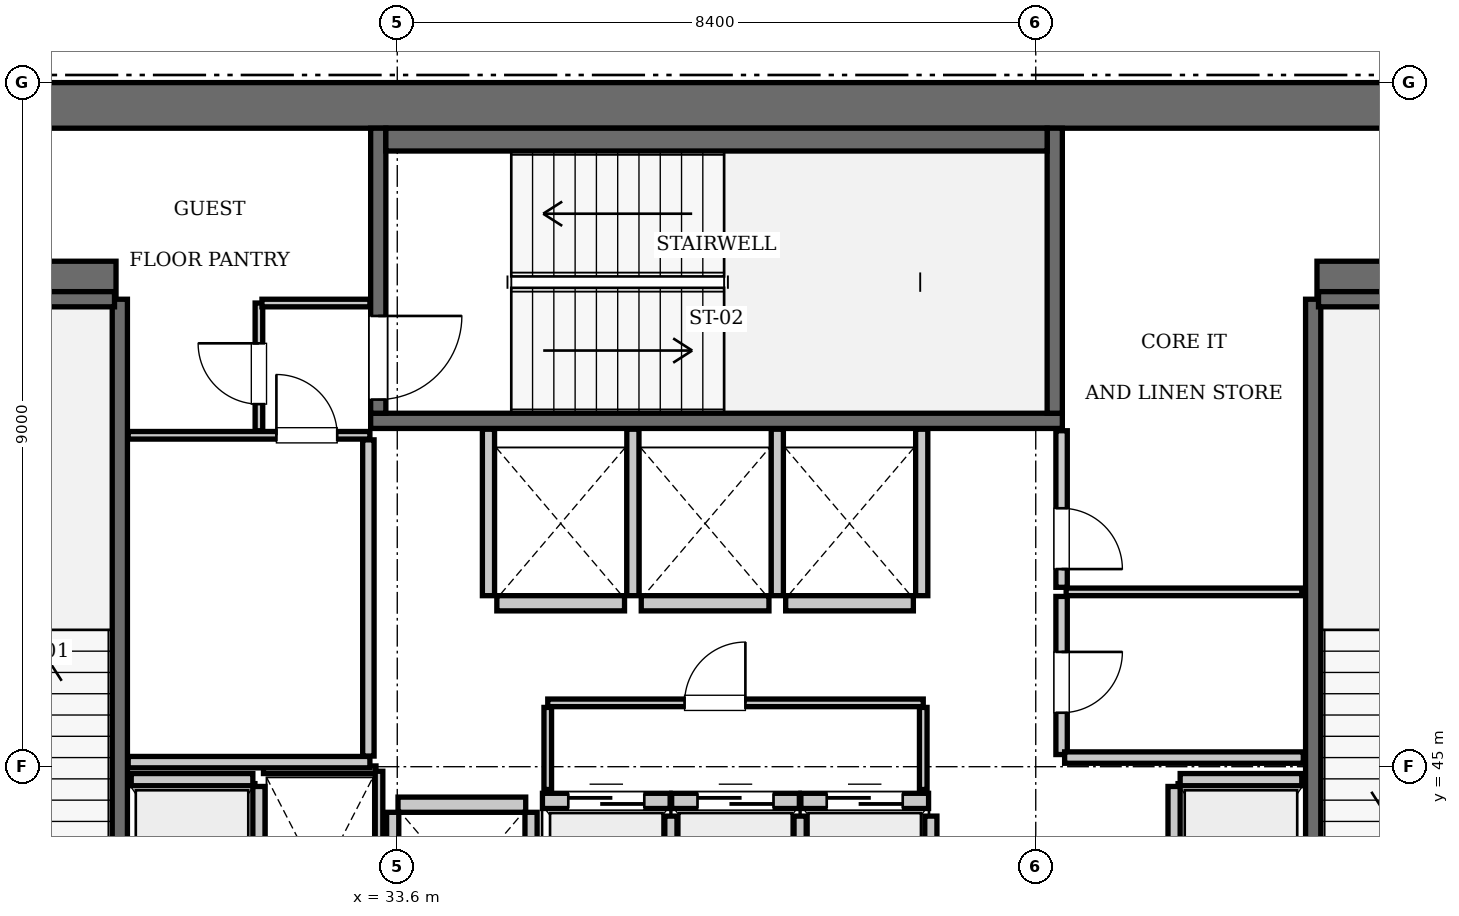
"""IFC4 building model, lengths in metres.
Left out: names, types, materials, properties, quantities, classifications, styles, units other than length and angle.
Written with IfcOpenShell. Run it as: python <this file> out.ifc"""

import sys

from ifc_helpers import new_model, si_unit, direction, frame, frame_2d, origin, place, context, subcontext, project, spatial, rectangle, extrude, element, fill, save


model = new_model("IFC4")
c1 = context("Model", 3, precision=1e-05, world=origin(), true_north=direction((0.0, 1.0)))
c2 = subcontext(c1, "Body", "Model", "MODEL_VIEW")
j1 = project(units=[si_unit("LENGTHUNIT", "METRE"), si_unit("PLANEANGLEUNIT", "RADIAN")], contexts=[c1])
p1 = place(None, origin())
s1 = spatial("IfcSite", under=j1, at=p1, CompositionType="ELEMENT")
p2 = place(p1, origin())
s2 = spatial("IfcBuilding", under=s1, at=p2, CompositionType="ELEMENT")
p3 = place(p2, frame((0.0, 0.0, 270.2)))
s3 = spatial("IfcBuildingStorey", under=s2, at=p3, CompositionType="ELEMENT", Elevation=270.2)
p4 = place(p3, frame((25.2, 53.7, 0.0), z_axis=(0.0, 0.0, 1.0), x_axis=(1.0, 0.0, 0.0)))
e1 = element("IfcWall", 1, at=p4, inside=s3, PredefinedType="SHEAR", context=c2, shape_type="SweptSolid", body=[
    extrude(rectangle(XDim=25.2, YDim=0.6, at=frame_2d((12.6, 0.0))), origin(), (0.0, 0.0, 1.0), 3.85),
])
p5 = place(p3, frame((25.8, 51.4, 0.0), z_axis=(0.0, 0.0, 1.0), x_axis=(1.0, 0.0, 0.0)))
e2 = element("IfcWall", 2, at=p5, inside=s3, PredefinedType="SHEAR", context=c2, shape_type="SweptSolid", body=[
    extrude(rectangle(XDim=4.1, YDim=0.5, at=frame_2d((2.05, 0.0))), origin(), (0.0, 0.0, 1.0), 3.85),
])
p6 = place(p3, frame((45.7, 51.4, 0.0), z_axis=(0.0, 0.0, 1.0), x_axis=(1.0, 0.0, 0.0)))
e3 = element("IfcWall", 3, at=p6, inside=s3, PredefinedType="SHEAR", context=c2, shape_type="SweptSolid", body=[
    extrude(rectangle(XDim=4.1, YDim=0.5, at=frame_2d((2.05, 0.0))), origin(), (0.0, 0.0, 1.0), 3.85),
])
p7 = place(p3, frame((29.95, 42.0, 0.0), z_axis=(0.0, 0.0, 1.0), x_axis=(0.0, 1.0, 0.0)))
e4 = element("IfcWall", 4, at=p7, inside=s3, PredefinedType="SOLIDWALL", context=c2, shape_type="SweptSolid", body=[
    extrude(rectangle(XDim=9.15, YDim=0.2, at=frame_2d((4.575, 0.0))), origin(), (0.0, 0.0, 1.0), 3.61),
])
p8 = place(p3, frame((26.38, 51.15, 0.0), z_axis=(0.0, 0.0, 1.0), x_axis=(1.0, 0.0, 0.0)))
e5 = element("IfcWall", 5, at=p8, inside=s3, PredefinedType="SOLIDWALL", context=c2, shape_type="SweptSolid", body=[
    extrude(rectangle(XDim=3.5, YDim=0.2, at=frame_2d((1.75, 0.0))), origin(), (0.0, 0.0, 1.0), 3.61),
])
p9 = place(p3, frame((33.25, 49.55, 0.0), z_axis=(0.0, 0.0, 1.0), x_axis=(1.0, 0.0, 0.0)))
e6 = element("IfcWall", 6, at=p9, inside=s3, PredefinedType="SOLIDWALL", context=c2, shape_type="SweptSolid", body=[
    extrude(rectangle(XDim=9.1, YDim=0.2, at=frame_2d((4.55, 0.0))), origin(), (0.0, 0.0, 1.0), 3.61),
])
p10 = place(p3, frame((42.25, 49.65, 0.0), z_axis=(0.0, 0.0, 1.0), x_axis=(0.0, 1.0, 0.0)))
e7 = element("IfcWall", 7, at=p10, inside=s3, PredefinedType="SOLIDWALL", context=c2, shape_type="SweptSolid", body=[
    extrude(rectangle(XDim=3.75, YDim=0.2, at=frame_2d((1.875, 0.0))), origin(), (0.0, 0.0, 1.0), 3.61),
])
p11 = place(p3, frame((33.35, 49.65, 0.0), z_axis=(0.0, 0.0, 1.0), x_axis=(0.0, 1.0, 0.0)))
e8 = element("IfcWall", 8, at=p11, inside=s3, PredefinedType="SOLIDWALL", context=c2, shape_type="SweptSolid", body=[
    extrude(rectangle(XDim=3.75, YDim=0.2, at=frame_2d((1.875, 0.0))), origin(), (0.0, 0.0, 1.0), 3.61),
])
p12 = place(p11, frame((0.18, 0.0, 0.0)))
e9 = element("IfcOpeningElement", 9, at=p12, cuts=e8, PredefinedType="OPENING", context=c2, shape_type="SweptSolid", body=[
    extrude(rectangle(XDim=1.1, YDim=2.15, at=frame_2d((0.55, 1.075))), frame((0.0, 0.11, 0.0), z_axis=(0.0, -1.0, 0.0), x_axis=(1.0, 0.0, 0.0)), (0.0, 0.0, 1.0), 0.22),
])
p13 = place(p3, frame((33.45, 53.25, 0.0), z_axis=(0.0, 0.0, 1.0), x_axis=(1.0, 0.0, 0.0)))
e10 = element("IfcWall", 10, at=p13, inside=s3, PredefinedType="SOLIDWALL", context=c2, shape_type="SweptSolid", body=[
    extrude(rectangle(XDim=8.7, YDim=0.3, at=frame_2d((4.35, 0.0))), origin(), (0.0, 0.0, 1.0), 3.61),
])
p14 = place(p3, frame((45.65, 42.0, 0.0), z_axis=(0.0, 0.0, 1.0), x_axis=(0.0, 1.0, 0.0)))
e11 = element("IfcWall", 11, at=p14, inside=s3, PredefinedType="SOLIDWALL", context=c2, shape_type="SweptSolid", body=[
    extrude(rectangle(XDim=9.15, YDim=0.2, at=frame_2d((4.575, 0.0))), origin(), (0.0, 0.0, 1.0), 3.61),
])
p15 = place(p3, frame((45.72, 51.15, 0.0), z_axis=(0.0, 0.0, 1.0), x_axis=(1.0, 0.0, 0.0)))
e12 = element("IfcWall", 12, at=p15, inside=s3, PredefinedType="SOLIDWALL", context=c2, shape_type="SweptSolid", body=[
    extrude(rectangle(XDim=3.5, YDim=0.2, at=frame_2d((1.75, 0.0))), origin(), (0.0, 0.0, 1.0), 3.61),
])
p16 = place(p3, frame((35.51, 44.55, 0.0), z_axis=(0.0, 0.0, 1.0), x_axis=(1.0, 0.0, 0.0)))
e13 = element("IfcWall", 13, at=p16, inside=s3, PredefinedType="SOLIDWALL", context=c2, shape_type="SweptSolid", body=[
    extrude(rectangle(XDim=1.68, YDim=0.2, at=frame_2d((0.84, 0.0))), origin(), (0.0, 0.0, 1.0), 3.61),
])
p17 = place(p16, frame((0.34, 0.0, 0.0)))
e14 = element("IfcOpeningElement", 14, at=p17, cuts=e13, PredefinedType="OPENING", context=c2, shape_type="SweptSolid", body=[
    extrude(rectangle(XDim=1.0, YDim=2.15, at=frame_2d((0.5, 1.075))), frame((0.0, 0.11, 0.0), z_axis=(0.0, -1.0, 0.0), x_axis=(1.0, 0.0, 0.0)), (0.0, 0.0, 1.0), 0.22),
])
p18 = place(p3, frame((37.21, 44.55, 0.0), z_axis=(0.0, 0.0, 1.0), x_axis=(1.0, 0.0, 0.0)))
e15 = element("IfcWall", 15, at=p18, inside=s3, PredefinedType="SOLIDWALL", context=c2, shape_type="SweptSolid", body=[
    extrude(rectangle(XDim=1.68, YDim=0.2, at=frame_2d((0.84, 0.0))), origin(), (0.0, 0.0, 1.0), 3.61),
])
p19 = place(p18, frame((0.34, 0.0, 0.0)))
e16 = element("IfcOpeningElement", 16, at=p19, cuts=e15, PredefinedType="OPENING", context=c2, shape_type="SweptSolid", body=[
    extrude(rectangle(XDim=1.0, YDim=2.15, at=frame_2d((0.5, 1.075))), frame((0.0, 0.11, 0.0), z_axis=(0.0, -1.0, 0.0), x_axis=(1.0, 0.0, 0.0)), (0.0, 0.0, 1.0), 0.22),
])
p20 = place(p3, frame((38.91, 44.55, 0.0), z_axis=(0.0, 0.0, 1.0), x_axis=(1.0, 0.0, 0.0)))
e17 = element("IfcWall", 17, at=p20, inside=s3, PredefinedType="SOLIDWALL", context=c2, shape_type="SweptSolid", body=[
    extrude(rectangle(XDim=1.68, YDim=0.2, at=frame_2d((0.84, 0.0))), origin(), (0.0, 0.0, 1.0), 3.61),
])
p21 = place(p20, frame((0.34, 0.0, 0.0)))
e18 = element("IfcOpeningElement", 18, at=p21, cuts=e17, PredefinedType="OPENING", context=c2, shape_type="SweptSolid", body=[
    extrude(rectangle(XDim=1.0, YDim=2.15, at=frame_2d((0.5, 1.075))), frame((0.0, 0.11, 0.0), z_axis=(0.0, -1.0, 0.0), x_axis=(1.0, 0.0, 0.0)), (0.0, 0.0, 1.0), 0.22),
])
p22 = place(p3, frame((34.91, 47.15, 0.0), z_axis=(0.0, 0.0, 1.0), x_axis=(1.0, 0.0, 0.0)))
e19 = element("IfcWall", 19, at=p22, inside=s3, PredefinedType="SOLIDWALL", context=c2, shape_type="SweptSolid", body=[
    extrude(rectangle(XDim=1.68, YDim=0.2, at=frame_2d((0.84, 0.0))), origin(), (0.0, 0.0, 1.0), 3.61),
])
for number, where, z_axis, x_axis in (
    (20, (36.81, 47.15, 0.0), (0.0, 0.0, 1.0), (1.0, 0.0, 0.0)),
    (21, (38.71, 47.15, 0.0), (0.0, 0.0, 1.0), (1.0, 0.0, 0.0)),
    (22, (33.61, 44.5, 0.0), (0.0, 0.0, 1.0), (1.0, 0.0, 0.0)),
):
    element("IfcWall", number, at=place(p3, frame(where, z_axis=z_axis, x_axis=x_axis)), inside=s3, PredefinedType="SOLIDWALL", context=c2, shape_type="SweptSolid", body=[
        extrude(rectangle(XDim=1.68, YDim=0.2, at=frame_2d((0.84, 0.0))), origin(), (0.0, 0.0, 1.0), 3.61),
    ])
p23 = place(p3, frame((30.1, 44.83, 0.0), z_axis=(0.0, 0.0, 1.0), x_axis=(1.0, 0.0, 0.0)))
e23 = element("IfcWall", 23, at=p23, inside=s3, PredefinedType="SOLIDWALL", context=c2, shape_type="SweptSolid", body=[
    extrude(rectangle(XDim=1.6, YDim=0.16, at=frame_2d((0.8, 0.0))), origin(), (0.0, 0.0, 1.0), 3.61),
])
p24 = place(p3, frame((31.78, 42.0, 0.0), z_axis=(0.0, 0.0, 1.0), x_axis=(0.0, 1.0, 0.0)))
e24 = element("IfcWall", 24, at=p24, inside=s3, PredefinedType="SOLIDWALL", context=c2, shape_type="SweptSolid", body=[
    extrude(rectangle(XDim=2.74, YDim=0.16, at=frame_2d((1.37, 0.0))), origin(), (0.0, 0.0, 1.0), 3.61),
])
p25 = place(p3, frame((43.9, 44.83, 0.0), z_axis=(0.0, 0.0, 1.0), x_axis=(1.0, 0.0, 0.0)))
e25 = element("IfcWall", 25, at=p25, inside=s3, PredefinedType="SOLIDWALL", context=c2, shape_type="SweptSolid", body=[
    extrude(rectangle(XDim=1.6, YDim=0.16, at=frame_2d((0.8, 0.0))), origin(), (0.0, 0.0, 1.0), 3.61),
])
p26 = place(p3, frame((43.82, 42.0, 0.0), z_axis=(0.0, 0.0, 1.0), x_axis=(0.0, 1.0, 0.0)))
e26 = element("IfcWall", 26, at=p26, inside=s3, PredefinedType="SOLIDWALL", context=c2, shape_type="SweptSolid", body=[
    extrude(rectangle(XDim=2.74, YDim=0.16, at=frame_2d((1.37, 0.0))), origin(), (0.0, 0.0, 1.0), 3.61),
])
for number, where, z_axis, x_axis in (
    (27, (37.2, 42.0, 0.0), (0.0, 0.0, 1.0), (0.0, 1.0, 0.0)),
    (28, (38.9, 42.0, 0.0), (0.0, 0.0, 1.0), (0.0, 1.0, 0.0)),
    (29, (40.62, 42.0, 0.0), (0.0, 0.0, 1.0), (0.0, 1.0, 0.0)),
):
    element("IfcWall", number, at=place(p3, frame(where, z_axis=z_axis, x_axis=x_axis)), inside=s3, PredefinedType="SOLIDWALL", context=c2, shape_type="SweptSolid", body=[
        extrude(rectangle(XDim=2.35, YDim=0.16, at=frame_2d((1.175, 0.0))), origin(), (0.0, 0.0, 1.0), 3.61),
    ])
for number, where, z_axis, x_axis in (
    (30, (34.8, 47.25, 0.0), (0.0, 0.0, 1.0), (0.0, 1.0, 0.0)),
    (31, (36.7, 47.25, 0.0), (0.0, 0.0, 1.0), (0.0, 1.0, 0.0)),
    (32, (38.6, 47.25, 0.0), (0.0, 0.0, 1.0), (0.0, 1.0, 0.0)),
    (33, (40.5, 47.25, 0.0), (0.0, 0.0, 1.0), (0.0, 1.0, 0.0)),
):
    element("IfcWall", number, at=place(p3, frame(where, z_axis=z_axis, x_axis=x_axis)), inside=s3, PredefinedType="SOLIDWALL", context=c2, shape_type="SweptSolid", body=[
        extrude(rectangle(XDim=2.19, YDim=0.16, at=frame_2d((1.095, 0.0))), origin(), (0.0, 0.0, 1.0), 3.61),
    ])
for number, where, z_axis, x_axis in (
    (34, (33.54, 42.0, 0.0), (0.0, 0.0, 1.0), (0.0, 1.0, 0.0)),
    (35, (35.36, 42.0, 0.0), (0.0, 0.0, 1.0), (0.0, 1.0, 0.0)),
):
    element("IfcWall", number, at=place(p3, frame(where, z_axis=z_axis, x_axis=x_axis)), inside=s3, PredefinedType="SOLIDWALL", context=c2, shape_type="SweptSolid", body=[
        extrude(rectangle(XDim=2.4, YDim=0.16, at=frame_2d((1.2, 0.0))), origin(), (0.0, 0.0, 1.0), 3.61),
    ])
p27 = place(p3, frame((31.84, 44.96, 0.0), z_axis=(0.0, 0.0, 1.0), x_axis=(1.0, 0.0, 0.0)))
e36 = element("IfcWall", 36, at=p27, inside=s3, PredefinedType="PARTITIONING", context=c2, shape_type="SweptSolid", body=[
    extrude(rectangle(XDim=1.48, YDim=0.1, at=frame_2d((0.74, 0.0))), origin(), (0.0, 0.0, 1.0), 3.61),
])
p28 = place(p3, frame((33.36, 42.06, 0.0), z_axis=(0.0, 0.0, 1.0), x_axis=(0.0, 1.0, 0.0)))
e37 = element("IfcWall", 37, at=p28, inside=s3, PredefinedType="PARTITIONING", context=c2, shape_type="SweptSolid", body=[
    extrude(rectangle(XDim=2.88, YDim=0.1, at=frame_2d((1.44, 0.0))), origin(), (0.0, 0.0, 1.0), 3.61),
])
p29 = place(p3, frame((35.58, 45.84, 0.0), z_axis=(0.0, 0.0, 1.0), x_axis=(1.0, 0.0, 0.0)))
e38 = element("IfcWall", 38, at=p29, inside=s3, PredefinedType="PARTITIONING", context=c2, shape_type="SweptSolid", body=[
    extrude(rectangle(XDim=4.94, YDim=0.1, at=frame_2d((2.47, 0.0))), origin(), (0.0, 0.0, 1.0), 3.61),
])
p30 = place(p29, frame((1.8, 0.0, 0.0)))
e39 = element("IfcOpeningElement", 39, at=p30, cuts=e38, PredefinedType="OPENING", context=c2, shape_type="SweptSolid", body=[
    extrude(rectangle(XDim=0.8, YDim=2.05, at=frame_2d((0.4, 1.025))), frame((0.0, 0.06, 0.0), z_axis=(0.0, -1.0, 0.0), x_axis=(1.0, 0.0, 0.0)), (0.0, 0.0, 1.0), 0.12),
])
for number, where, z_axis, x_axis in (
    (40, (35.58, 44.7, 0.0), (0.0, 0.0, 1.0), (0.0, 1.0, 0.0)),
    (41, (40.52, 44.7, 0.0), (0.0, 0.0, 1.0), (0.0, 1.0, 0.0)),
):
    element("IfcWall", number, at=place(p3, frame(where, z_axis=z_axis, x_axis=x_axis)), inside=s3, PredefinedType="PARTITIONING", context=c2, shape_type="SweptSolid", body=[
        extrude(rectangle(XDim=1.08, YDim=0.1, at=frame_2d((0.54, 0.0))), origin(), (0.0, 0.0, 1.0), 3.61),
    ])
p31 = place(p3, frame((30.06, 45.06, 0.0), z_axis=(0.0, 0.0, 1.0), x_axis=(1.0, 0.0, 0.0)))
e42 = element("IfcWall", 42, at=p31, inside=s3, PredefinedType="PARTITIONING", context=c2, shape_type="SweptSolid", body=[
    extrude(rectangle(XDim=3.18, YDim=0.15, at=frame_2d((1.59, 0.0))), origin(), (0.0, 0.0, 1.0), 3.61),
])
p32 = place(p3, frame((33.22, 45.14, 0.0), z_axis=(0.0, 0.0, 1.0), x_axis=(0.0, 1.0, 0.0)))
e43 = element("IfcWall", 43, at=p32, inside=s3, PredefinedType="PARTITIONING", context=c2, shape_type="SweptSolid", body=[
    extrude(rectangle(XDim=4.16, YDim=0.15, at=frame_2d((2.08, 0.0))), origin(), (0.0, 0.0, 1.0), 3.61),
])
p33 = place(p3, frame((30.06, 49.36, 0.0), z_axis=(0.0, 0.0, 1.0), x_axis=(1.0, 0.0, 0.0)))
e44 = element("IfcWall", 44, at=p33, inside=s3, PredefinedType="PARTITIONING", context=c2, shape_type="SweptSolid", body=[
    extrude(rectangle(XDim=3.18, YDim=0.1, at=frame_2d((1.59, 0.0))), origin(), (0.0, 0.0, 1.0), 3.61),
])
p34 = place(p33, frame((1.95, 0.0, 0.0)))
e45 = element("IfcOpeningElement", 45, at=p34, cuts=e44, PredefinedType="OPENING", context=c2, shape_type="SweptSolid", body=[
    extrude(rectangle(XDim=0.8, YDim=2.05, at=frame_2d((0.4, 1.025))), frame((0.0, 0.06, 0.0), z_axis=(0.0, -1.0, 0.0), x_axis=(1.0, 0.0, 0.0)), (0.0, 0.0, 1.0), 0.12),
])
p35 = place(p3, frame((31.78, 49.42, 0.0), z_axis=(0.0, 0.0, 1.0), x_axis=(0.0, 1.0, 0.0)))
e46 = element("IfcWall", 46, at=p35, inside=s3, PredefinedType="PARTITIONING", context=c2, shape_type="SweptSolid", body=[
    extrude(rectangle(XDim=1.68, YDim=0.1, at=frame_2d((0.84, 0.0))), origin(), (0.0, 0.0, 1.0), 3.61),
])
p36 = place(p35, frame((0.35, 0.0, 0.0)))
e47 = element("IfcOpeningElement", 47, at=p36, cuts=e46, PredefinedType="OPENING", context=c2, shape_type="SweptSolid", body=[
    extrude(rectangle(XDim=0.8, YDim=2.05, at=frame_2d((0.4, 1.025))), frame((0.0, 0.06, 0.0), z_axis=(0.0, -1.0, 0.0), x_axis=(1.0, 0.0, 0.0)), (0.0, 0.0, 1.0), 0.12),
])
p37 = place(p3, frame((31.82, 51.1, 0.0), z_axis=(0.0, 0.0, 1.0), x_axis=(1.0, 0.0, 0.0)))
e48 = element("IfcWall", 48, at=p37, inside=s3, PredefinedType="PARTITIONING", context=c2, shape_type="SweptSolid", body=[
    extrude(rectangle(XDim=1.42, YDim=0.1, at=frame_2d((0.71, 0.0))), origin(), (0.0, 0.0, 1.0), 3.61),
])
p38 = place(p3, frame((42.34, 45.16, 0.0), z_axis=(0.0, 0.0, 1.0), x_axis=(0.0, 1.0, 0.0)))
e49 = element("IfcWall", 49, at=p38, inside=s3, PredefinedType="PARTITIONING", context=c2, shape_type="SweptSolid", body=[
    extrude(rectangle(XDim=2.08, YDim=0.15, at=frame_2d((1.04, 0.0))), origin(), (0.0, 0.0, 1.0), 3.61),
])
p39 = place(p38, frame((0.55, 0.0, 0.0)))
e50 = element("IfcOpeningElement", 50, at=p39, cuts=e49, PredefinedType="OPENING", context=c2, shape_type="SweptSolid", body=[
    extrude(rectangle(XDim=0.8, YDim=2.05, at=frame_2d((0.4, 1.025))), frame((0.0, 0.085, 0.0), z_axis=(0.0, -1.0, 0.0), x_axis=(1.0, 0.0, 0.0)), (0.0, 0.0, 1.0), 0.17),
])
p40 = place(p3, frame((42.34, 47.36, 0.0), z_axis=(0.0, 0.0, 1.0), x_axis=(0.0, 1.0, 0.0)))
e51 = element("IfcWall", 51, at=p40, inside=s3, PredefinedType="PARTITIONING", context=c2, shape_type="SweptSolid", body=[
    extrude(rectangle(XDim=2.06, YDim=0.15, at=frame_2d((1.03, 0.0))), origin(), (0.0, 0.0, 1.0), 3.61),
])
p41 = place(p40, frame((0.24, 0.0, 0.0)))
e52 = element("IfcOpeningElement", 52, at=p41, cuts=e51, PredefinedType="OPENING", context=c2, shape_type="SweptSolid", body=[
    extrude(rectangle(XDim=0.8, YDim=2.05, at=frame_2d((0.4, 1.025))), frame((0.0, 0.085, 0.0), z_axis=(0.0, -1.0, 0.0), x_axis=(1.0, 0.0, 0.0)), (0.0, 0.0, 1.0), 0.17),
])
p42 = place(p3, frame((42.4, 47.3, 0.0), z_axis=(0.0, 0.0, 1.0), x_axis=(1.0, 0.0, 0.0)))
e53 = element("IfcWall", 53, at=p42, inside=s3, PredefinedType="PARTITIONING", context=c2, shape_type="SweptSolid", body=[
    extrude(rectangle(XDim=3.1, YDim=0.1, at=frame_2d((1.55, 0.0))), origin(), (0.0, 0.0, 1.0), 3.61),
])
p43 = place(p3, frame((42.38, 45.12, 0.0), z_axis=(0.0, 0.0, 1.0), x_axis=(1.0, 0.0, 0.0)))
e54 = element("IfcWall", 54, at=p43, inside=s3, PredefinedType="PARTITIONING", context=c2, shape_type="SweptSolid", body=[
    extrude(rectangle(XDim=3.14, YDim=0.15, at=frame_2d((1.57, 0.0))), origin(), (0.0, 0.0, 1.0), 3.61),
])
p44 = place(p12, frame((1.1, 0.0, 0.0), z_axis=(0.0, 0.0, 1.0), x_axis=(-1.0, 0.0, 0.0)))
e55 = element("IfcDoor", 55, at=p44, inside=s3, OperationType="SINGLE_SWING_LEFT", PredefinedType="DOOR", context=c2, shape_type="SweptSolid", body=[
    extrude(rectangle(XDim=1.1, YDim=2.15, at=frame_2d((0.55, 1.075))), frame((0.0, 0.025, 0.0), z_axis=(0.0, -1.0, 0.0), x_axis=(1.0, 0.0, 0.0)), (0.0, 0.0, 1.0), 0.05),
])
fill(e9, e55)
p45 = place(p17, origin())
e56 = element("IfcDoor", 56, at=p45, inside=s3, OperationType="SLIDING_TO_LEFT", PredefinedType="DOOR", context=c2, shape_type="SweptSolid", body=[
    extrude(rectangle(XDim=1.0, YDim=2.15, at=frame_2d((0.5, 1.075))), frame((0.0, 0.025, 0.0), z_axis=(0.0, -1.0, 0.0), x_axis=(1.0, 0.0, 0.0)), (0.0, 0.0, 1.0), 0.05),
])
fill(e14, e56)
p46 = place(p19, origin())
e57 = element("IfcDoor", 57, at=p46, inside=s3, OperationType="SLIDING_TO_LEFT", PredefinedType="DOOR", context=c2, shape_type="SweptSolid", body=[
    extrude(rectangle(XDim=1.0, YDim=2.15, at=frame_2d((0.5, 1.075))), frame((0.0, 0.025, 0.0), z_axis=(0.0, -1.0, 0.0), x_axis=(1.0, 0.0, 0.0)), (0.0, 0.0, 1.0), 0.05),
])
fill(e16, e57)
p47 = place(p21, origin())
e58 = element("IfcDoor", 58, at=p47, inside=s3, OperationType="SLIDING_TO_LEFT", PredefinedType="DOOR", context=c2, shape_type="SweptSolid", body=[
    extrude(rectangle(XDim=1.0, YDim=2.15, at=frame_2d((0.5, 1.075))), frame((0.0, 0.025, 0.0), z_axis=(0.0, -1.0, 0.0), x_axis=(1.0, 0.0, 0.0)), (0.0, 0.0, 1.0), 0.05),
])
fill(e18, e58)
p48 = place(p30, origin())
e59 = element("IfcDoor", 59, at=p48, inside=s3, OperationType="SINGLE_SWING_RIGHT", PredefinedType="DOOR", context=c2, shape_type="SweptSolid", body=[
    extrude(rectangle(XDim=0.8, YDim=2.05, at=frame_2d((0.4, 1.025))), frame((0.0, 0.025, 0.0), z_axis=(0.0, -1.0, 0.0), x_axis=(1.0, 0.0, 0.0)), (0.0, 0.0, 1.0), 0.05),
])
fill(e39, e59)
p49 = place(p34, origin())
e60 = element("IfcDoor", 60, at=p49, inside=s3, OperationType="SINGLE_SWING_LEFT", PredefinedType="DOOR", context=c2, shape_type="SweptSolid", body=[
    extrude(rectangle(XDim=0.8, YDim=2.05, at=frame_2d((0.4, 1.025))), frame((0.0, 0.025, 0.0), z_axis=(0.0, -1.0, 0.0), x_axis=(1.0, 0.0, 0.0)), (0.0, 0.0, 1.0), 0.05),
])
fill(e45, e60)
p50 = place(p36, origin())
e61 = element("IfcDoor", 61, at=p50, inside=s3, OperationType="SINGLE_SWING_RIGHT", PredefinedType="DOOR", context=c2, shape_type="SweptSolid", body=[
    extrude(rectangle(XDim=0.8, YDim=2.05, at=frame_2d((0.4, 1.025))), frame((0.0, 0.025, 0.0), z_axis=(0.0, -1.0, 0.0), x_axis=(1.0, 0.0, 0.0)), (0.0, 0.0, 1.0), 0.05),
])
fill(e47, e61)
p51 = place(p39, frame((0.8, 0.0, 0.0), z_axis=(0.0, 0.0, 1.0), x_axis=(-1.0, 0.0, 0.0)))
e62 = element("IfcDoor", 62, at=p51, inside=s3, OperationType="SINGLE_SWING_LEFT", PredefinedType="DOOR", context=c2, shape_type="SweptSolid", body=[
    extrude(rectangle(XDim=0.8, YDim=2.05, at=frame_2d((0.4, 1.025))), frame((0.0, 0.025, 0.0), z_axis=(0.0, -1.0, 0.0), x_axis=(1.0, 0.0, 0.0)), (0.0, 0.0, 1.0), 0.05),
])
fill(e50, e62)
p52 = place(p41, frame((0.8, 0.0, 0.0), z_axis=(0.0, 0.0, 1.0), x_axis=(-1.0, 0.0, 0.0)))
e63 = element("IfcDoor", 63, at=p52, inside=s3, OperationType="SINGLE_SWING_RIGHT", PredefinedType="DOOR", context=c2, shape_type="SweptSolid", body=[
    extrude(rectangle(XDim=0.8, YDim=2.05, at=frame_2d((0.4, 1.025))), frame((0.0, 0.025, 0.0), z_axis=(0.0, -1.0, 0.0), x_axis=(1.0, 0.0, 0.0)), (0.0, 0.0, 1.0), 0.05),
])
fill(e52, e63)
save(model, sys.argv[1])
